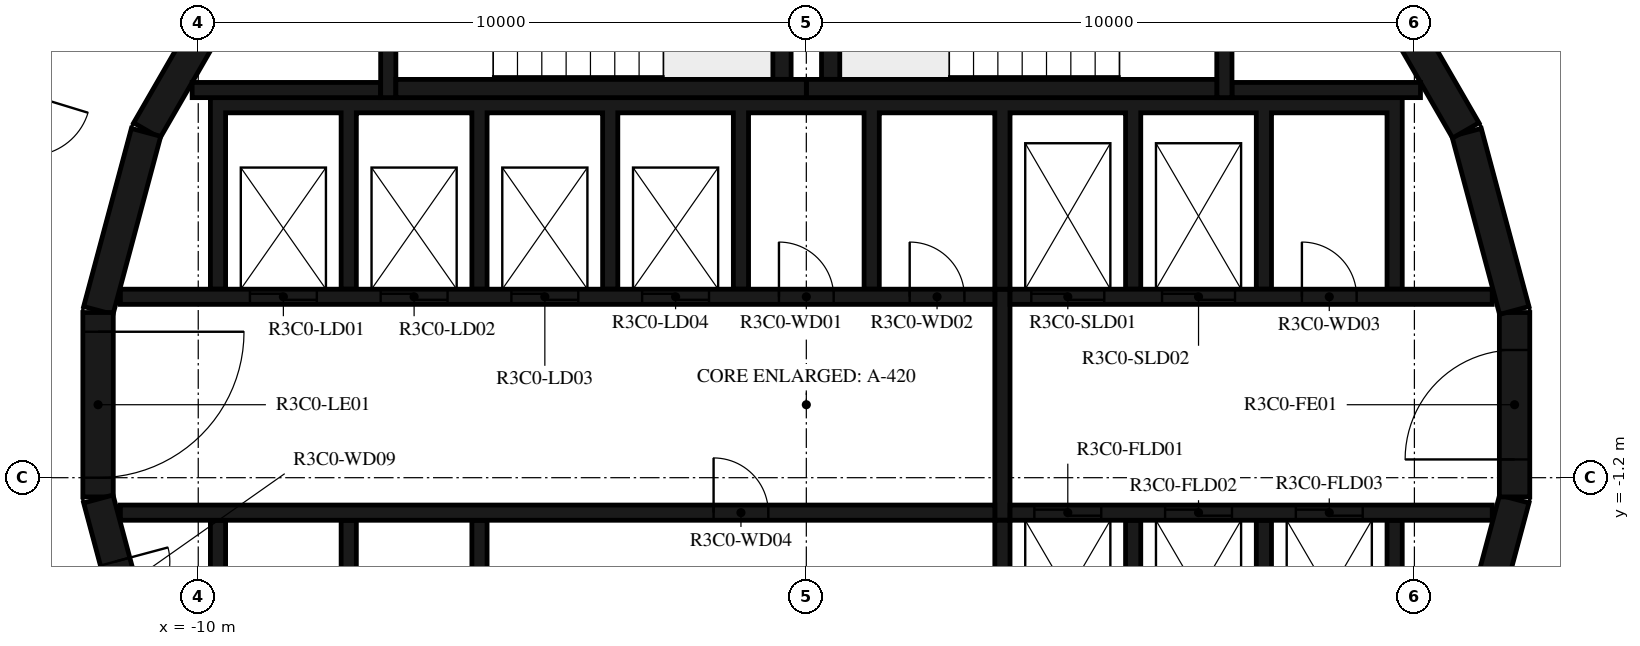
"""IFC4 building model, lengths in metres.
Left out: names, types, materials, properties, quantities, classifications, styles, units other than length and angle.
Written with IfcOpenShell. Run it as: python <this file> out.ifc"""

import sys

from ifc_helpers import new_model, si_unit, direction, frame, frame_2d, origin, place, context, subcontext, project, spatial, polyline, rectangle, outline, extrude, element, fill, save


model = new_model("IFC4")
c1 = context("Model", 3, precision=1e-05, world=origin(), true_north=direction((0.0, 1.0)))
c2 = subcontext(c1, "Body", "Model", "MODEL_VIEW")
j1 = project(units=[si_unit("LENGTHUNIT", "METRE"), si_unit("PLANEANGLEUNIT", "RADIAN")], contexts=[c1])
p1 = place(None, origin())
s1 = spatial("IfcSite", under=j1, at=p1, CompositionType="ELEMENT")
p2 = place(p1, origin())
s2 = spatial("IfcBuilding", under=s1, at=p2, CompositionType="ELEMENT")
p3 = place(p2, frame((0.0, 0.0, 141.4)))
s3 = spatial("IfcBuildingStorey", under=s2, at=p3, CompositionType="ELEMENT", Elevation=141.4)
p4 = place(p3, frame((10.858, -4.479, 0.0), z_axis=(0.0, 0.0, 1.0), x_axis=(0.258734743916, 0.965948410781, 0.0)))
e1 = element("IfcWall", 1, at=p4, inside=s3, PredefinedType="SHEAR", context=c2, shape_type="SweptSolid", body=[
    extrude(rectangle(XDim=3.033, YDim=0.5, at=frame_2d((1.516, 0.0))), origin(), (0.0, 0.0, 1.0), 3.05),
])
p5 = place(p3, frame((11.647, -1.516, 0.0), z_axis=(0.0, 0.0, 1.0), x_axis=(0.0, 1.0, 0.0)))
e2 = element("IfcWall", 2, at=p5, inside=s3, PredefinedType="SHEAR", context=c2, shape_type="SweptSolid", body=[
    extrude(rectangle(XDim=3.033, YDim=0.5, at=frame_2d((1.516, 0.0))), origin(), (0.0, 0.0, 1.0), 3.05),
])
p6 = place(p5, frame((0.616, 0.0, 0.0)))
e3 = element("IfcOpeningElement", 3, at=p6, cuts=e2, PredefinedType="OPENING", context=c2, shape_type="SweptSolid", body=[
    extrude(rectangle(XDim=1.8, YDim=2.1, at=frame_2d((0.9, 1.05))), frame((0.0, 0.26, 0.0), z_axis=(0.0, -1.0, 0.0), x_axis=(1.0, 0.0, 0.0)), (0.0, 0.0, 1.0), 0.52),
])
for number, where, z_axis, x_axis in (
    (4, (11.643, 1.55, 0.0), (0.0, 0.0, 1.0), (-0.259, 0.966, 0.0)),
    (5, (10.845, 4.51, 0.0), (0.0, 0.0, 1.0), (-0.5, 0.866, 0.0)),
    (6, (-9.329, 7.137, 0.0), (0.0, 0.0, 1.0), (-0.5, -0.866, 0.0)),
    (7, (-10.858, 4.479, 0.0), (0.0, 0.0, 1.0), (-0.259, -0.966, 0.0)),
):
    element("IfcWall", number, at=place(p3, frame(where, z_axis=z_axis, x_axis=x_axis)), inside=s3, PredefinedType="SHEAR", context=c2, shape_type="SweptSolid", body=[
        extrude(rectangle(XDim=3.033, YDim=0.5, at=frame_2d((1.516, 0.0))), origin(), (0.0, 0.0, 1.0), 3.05),
    ])
p7 = place(p3, frame((-11.647, 1.516, 0.0), z_axis=(0.0, 0.0, 1.0), x_axis=(0.0, -1.0, 0.0)))
e8 = element("IfcWall", 8, at=p7, inside=s3, PredefinedType="SHEAR", context=c2, shape_type="SweptSolid", body=[
    extrude(rectangle(XDim=3.033, YDim=0.5, at=frame_2d((1.516, 0.0))), origin(), (0.0, 0.0, 1.0), 3.05),
])
p8 = place(p7, frame((0.316, 0.0, 0.0)))
e9 = element("IfcOpeningElement", 9, at=p8, cuts=e8, PredefinedType="OPENING", context=c2, shape_type="SweptSolid", body=[
    extrude(rectangle(XDim=2.4, YDim=2.1, at=frame_2d((1.2, 1.05))), frame((0.0, 0.26, 0.0), z_axis=(0.0, -1.0, 0.0), x_axis=(1.0, 0.0, 0.0)), (0.0, 0.0, 1.0), 0.52),
])
p9 = place(p3, frame((-11.643, -1.55, 0.0), z_axis=(0.0, 0.0, 1.0), x_axis=(0.258734743916, -0.965948410781, 0.0)))
e10 = element("IfcWall", 10, at=p9, inside=s3, PredefinedType="SHEAR", context=c2, shape_type="SweptSolid", body=[
    extrude(rectangle(XDim=3.033, YDim=0.5, at=frame_2d((1.516, 0.0))), origin(), (0.0, 0.0, 1.0), 3.05),
])
p10 = place(p9, frame((1.066, 0.0, 0.0)))
e11 = element("IfcOpeningElement", 11, at=p10, cuts=e10, PredefinedType="OPENING", context=c2, shape_type="SweptSolid", body=[
    extrude(rectangle(XDim=0.9, YDim=2.1, at=frame_2d((0.45, 1.05))), frame((0.0, 0.26, 0.0), z_axis=(0.0, -1.0, 0.0), x_axis=(1.0, 0.0, 0.0)), (0.0, 0.0, 1.0), 0.52),
])
p11 = place(p3, frame((0.0, 5.2, 0.0), z_axis=(0.0, 0.0, 1.0), x_axis=(1.0, 0.0, 0.0)))
e12 = element("IfcWall", 12, at=p11, inside=s3, PredefinedType="SHEAR", context=c2, shape_type="SweptSolid", body=[
    extrude(rectangle(XDim=6.75, YDim=0.3, at=frame_2d((3.375, 0.0))), origin(), (0.0, 0.0, 1.0), 3.05),
])
p12 = place(p3, frame((0.4, 5.35, 0.0), z_axis=(0.0, 0.0, 1.0), x_axis=(0.0, 1.0, 0.0)))
e13 = element("IfcWall", 13, at=p12, inside=s3, PredefinedType="SHEAR", context=c2, shape_type="SweptSolid", body=[
    extrude(rectangle(XDim=3.32, YDim=0.3, at=frame_2d((1.66, 0.0))), origin(), (0.0, 0.0, 1.0), 3.05),
])
p13 = place(p3, frame((6.875, 5.05, 0.0), z_axis=(0.0, 0.0, 1.0), x_axis=(0.0, 1.0, 0.0)))
e14 = element("IfcWall", 14, at=p13, inside=s3, PredefinedType="SHEAR", context=c2, shape_type="SweptSolid", body=[
    extrude(rectangle(XDim=3.92, YDim=0.25, at=frame_2d((1.96, 0.0))), origin(), (0.0, 0.0, 1.0), 3.05),
])
p14 = place(p13, frame((1.11, 0.0, 0.0)))
e15 = element("IfcOpeningElement", 15, at=p14, cuts=e14, PredefinedType="OPENING", context=c2, shape_type="SweptSolid", body=[
    extrude(rectangle(XDim=1.2, YDim=2.1, at=frame_2d((0.6, 1.05))), frame((0.0, 0.135, 0.0), z_axis=(0.0, -1.0, 0.0), x_axis=(1.0, 0.0, 0.0)), (0.0, 0.0, 1.0), 0.27),
])
p15 = place(p3, frame((7.0, 5.175, 0.0), z_axis=(0.0, 0.0, 1.0), x_axis=(1.0, 0.0, 0.0)))
e16 = element("IfcWall", 16, at=p15, inside=s3, PredefinedType="SHEAR", context=c2, shape_type="SweptSolid", body=[
    extrude(rectangle(XDim=3.1, YDim=0.25, at=frame_2d((1.55, 0.0))), origin(), (0.0, 0.0, 1.0), 3.05),
])
p16 = place(p3, frame((-6.75, 5.2, 0.0), z_axis=(0.0, 0.0, 1.0), x_axis=(1.0, 0.0, 0.0)))
e17 = element("IfcWall", 17, at=p16, inside=s3, PredefinedType="SHEAR", context=c2, shape_type="SweptSolid", body=[
    extrude(rectangle(XDim=6.75, YDim=0.3, at=frame_2d((3.375, 0.0))), origin(), (0.0, 0.0, 1.0), 3.05),
])
p17 = place(p3, frame((-0.4, 5.35, 0.0), z_axis=(0.0, 0.0, 1.0), x_axis=(0.0, 1.0, 0.0)))
e18 = element("IfcWall", 18, at=p17, inside=s3, PredefinedType="SHEAR", context=c2, shape_type="SweptSolid", body=[
    extrude(rectangle(XDim=3.32, YDim=0.3, at=frame_2d((1.66, 0.0))), origin(), (0.0, 0.0, 1.0), 3.05),
])
p18 = place(p3, frame((-6.875, 8.97, 0.0), z_axis=(0.0, 0.0, 1.0), x_axis=(0.0, -1.0, 0.0)))
e19 = element("IfcWall", 19, at=p18, inside=s3, PredefinedType="SHEAR", context=c2, shape_type="SweptSolid", body=[
    extrude(rectangle(XDim=3.92, YDim=0.25, at=frame_2d((1.96, 0.0))), origin(), (0.0, 0.0, 1.0), 3.05),
])
p19 = place(p18, frame((1.61, 0.0, 0.0)))
e20 = element("IfcOpeningElement", 20, at=p19, cuts=e19, PredefinedType="OPENING", context=c2, shape_type="SweptSolid", body=[
    extrude(rectangle(XDim=1.2, YDim=2.1, at=frame_2d((0.6, 1.05))), frame((0.0, 0.135, 0.0), z_axis=(0.0, -1.0, 0.0), x_axis=(1.0, 0.0, 0.0)), (0.0, 0.0, 1.0), 0.27),
])
p20 = place(p3, frame((-7.0, 5.175, 0.0), z_axis=(0.0, 0.0, 1.0), x_axis=(-1.0, 0.0, 0.0)))
e21 = element("IfcWall", 21, at=p20, inside=s3, PredefinedType="SHEAR", context=c2, shape_type="SweptSolid", body=[
    extrude(rectangle(XDim=3.1, YDim=0.25, at=frame_2d((1.55, 0.0))), origin(), (0.0, 0.0, 1.0), 3.05),
])
p21 = place(p3, origin())
e22 = element("IfcWall", 22, at=p21, inside=s3, PredefinedType="SHEAR", context=c2, shape_type="SweptSolid", body=[
    extrude(outline(polyline([(-9.55, 4.8), (-7.65, 4.8), (-7.65, 1.9), (-7.4, 1.9), (-7.4, 4.8), (-5.5, 4.8), (-5.5, 1.9), (-5.25, 1.9), (-5.25, 4.8), (-3.35, 4.8), (-3.35, 1.9), (-3.1, 1.9), (-3.1, 4.8), (-1.2, 4.8), (-1.2, 1.9), (-0.95, 1.9), (-0.95, 4.8), (0.95, 4.8), (0.95, 1.9), (1.2, 1.9), (1.2, 4.8), (3.1, 4.8), (3.1, 1.9), (3.35, 1.9), (3.35, 4.8), (5.25, 4.8), (5.25, 1.9), (5.5, 1.9), (5.5, 4.8), (7.4, 4.8), (7.4, 1.9), (7.65, 1.9), (7.65, 4.8), (9.55, 4.8), (9.55, 1.9), (9.8, 1.9), (9.8, 4.8), (9.8, 5.05), (-9.8, 5.05), (-9.8, 4.8), (-9.8, 1.9), (-9.55, 1.9), (-9.55, 4.8)])), origin(), (0.0, 0.0, 1.0), 3.05),
])
p22 = place(p3, origin())
e23 = element("IfcWall", 23, at=p22, inside=s3, PredefinedType="SHEAR", context=c2, shape_type="SweptSolid", body=[
    extrude(outline(polyline([(9.8, -5.05), (9.8, -4.8), (9.8, -1.9), (9.55, -1.9), (9.55, -4.8), (7.65, -4.8), (7.65, -1.9), (7.4, -1.9), (7.4, -4.8), (5.5, -4.8), (5.5, -1.9), (5.25, -1.9), (5.25, -4.8), (3.35, -4.8), (3.35, -1.9), (3.1, -1.9), (3.1, -4.8), (-5.25, -4.8), (-5.25, -1.9), (-5.5, -1.9), (-5.5, -4.8), (-7.4, -4.8), (-7.4, -1.9), (-7.65, -1.9), (-7.65, -4.8), (-9.55, -4.8), (-9.55, -1.9), (-9.8, -1.9), (-9.8, -4.8), (-9.8, -5.05), (9.8, -5.05)])), origin(), (0.0, 0.0, 1.0), 3.05),
])
p23 = place(p3, frame((-11.28, 1.775, 0.0), z_axis=(0.0, 0.0, 1.0), x_axis=(1.0, 0.0, 0.0)))
e24 = element("IfcWall", 24, at=p23, inside=s3, PredefinedType="SHEAR", context=c2, shape_type="SweptSolid", body=[
    extrude(rectangle(XDim=14.38, YDim=0.25, at=frame_2d((7.19, 0.0))), origin(), (0.0, 0.0, 1.0), 3.05),
])
p24 = place(p23, frame((2.13, 0.0, 0.0)))
e25 = element("IfcOpeningElement", 25, at=p24, cuts=e24, PredefinedType="OPENING", context=c2, shape_type="SweptSolid", body=[
    extrude(rectangle(XDim=1.1, YDim=2.1, at=frame_2d((0.55, 1.05))), frame((0.0, 0.135, 0.0), z_axis=(0.0, -1.0, 0.0), x_axis=(1.0, 0.0, 0.0)), (0.0, 0.0, 1.0), 0.27),
])
p25 = place(p23, frame((4.28, 0.0, 0.0)))
e26 = element("IfcOpeningElement", 26, at=p25, cuts=e24, PredefinedType="OPENING", context=c2, shape_type="SweptSolid", body=[
    extrude(rectangle(XDim=1.1, YDim=2.1, at=frame_2d((0.55, 1.05))), frame((0.0, 0.135, 0.0), z_axis=(0.0, -1.0, 0.0), x_axis=(1.0, 0.0, 0.0)), (0.0, 0.0, 1.0), 0.27),
])
p26 = place(p23, frame((6.43, 0.0, 0.0)))
e27 = element("IfcOpeningElement", 27, at=p26, cuts=e24, PredefinedType="OPENING", context=c2, shape_type="SweptSolid", body=[
    extrude(rectangle(XDim=1.1, YDim=2.1, at=frame_2d((0.55, 1.05))), frame((0.0, 0.135, 0.0), z_axis=(0.0, -1.0, 0.0), x_axis=(1.0, 0.0, 0.0)), (0.0, 0.0, 1.0), 0.27),
])
p27 = place(p23, frame((8.58, 0.0, 0.0)))
e28 = element("IfcOpeningElement", 28, at=p27, cuts=e24, PredefinedType="OPENING", context=c2, shape_type="SweptSolid", body=[
    extrude(rectangle(XDim=1.1, YDim=2.1, at=frame_2d((0.55, 1.05))), frame((0.0, 0.135, 0.0), z_axis=(0.0, -1.0, 0.0), x_axis=(1.0, 0.0, 0.0)), (0.0, 0.0, 1.0), 0.27),
])
p28 = place(p23, frame((10.83, 0.0, 0.0)))
e29 = element("IfcOpeningElement", 29, at=p28, cuts=e24, PredefinedType="OPENING", context=c2, shape_type="SweptSolid", body=[
    extrude(rectangle(XDim=0.9, YDim=2.1, at=frame_2d((0.45, 1.05))), frame((0.0, 0.135, 0.0), z_axis=(0.0, -1.0, 0.0), x_axis=(1.0, 0.0, 0.0)), (0.0, 0.0, 1.0), 0.27),
])
p29 = place(p23, frame((12.98, 0.0, 0.0)))
e30 = element("IfcOpeningElement", 30, at=p29, cuts=e24, PredefinedType="OPENING", context=c2, shape_type="SweptSolid", body=[
    extrude(rectangle(XDim=0.9, YDim=2.1, at=frame_2d((0.45, 1.05))), frame((0.0, 0.135, 0.0), z_axis=(0.0, -1.0, 0.0), x_axis=(1.0, 0.0, 0.0)), (0.0, 0.0, 1.0), 0.27),
])
p30 = place(p3, frame((3.35, 1.775, 0.0), z_axis=(0.0, 0.0, 1.0), x_axis=(1.0, 0.0, 0.0)))
e31 = element("IfcWall", 31, at=p30, inside=s3, PredefinedType="SHEAR", context=c2, shape_type="SweptSolid", body=[
    extrude(rectangle(XDim=7.93, YDim=0.25, at=frame_2d((3.965, 0.0))), origin(), (0.0, 0.0, 1.0), 3.05),
])
p31 = place(p30, frame((0.35, 0.0, 0.0)))
e32 = element("IfcOpeningElement", 32, at=p31, cuts=e31, PredefinedType="OPENING", context=c2, shape_type="SweptSolid", body=[
    extrude(rectangle(XDim=1.2, YDim=2.4, at=frame_2d((0.6, 1.2))), frame((0.0, 0.135, 0.0), z_axis=(0.0, -1.0, 0.0), x_axis=(1.0, 0.0, 0.0)), (0.0, 0.0, 1.0), 0.27),
])
p32 = place(p30, frame((2.5, 0.0, 0.0)))
e33 = element("IfcOpeningElement", 33, at=p32, cuts=e31, PredefinedType="OPENING", context=c2, shape_type="SweptSolid", body=[
    extrude(rectangle(XDim=1.2, YDim=2.4, at=frame_2d((0.6, 1.2))), frame((0.0, 0.135, 0.0), z_axis=(0.0, -1.0, 0.0), x_axis=(1.0, 0.0, 0.0)), (0.0, 0.0, 1.0), 0.27),
])
p33 = place(p30, frame((4.8, 0.0, 0.0)))
e34 = element("IfcOpeningElement", 34, at=p33, cuts=e31, PredefinedType="OPENING", context=c2, shape_type="SweptSolid", body=[
    extrude(rectangle(XDim=0.9, YDim=2.1, at=frame_2d((0.45, 1.05))), frame((0.0, 0.135, 0.0), z_axis=(0.0, -1.0, 0.0), x_axis=(1.0, 0.0, 0.0)), (0.0, 0.0, 1.0), 0.27),
])
p34 = place(p3, frame((-11.28, -1.775, 0.0), z_axis=(0.0, 0.0, 1.0), x_axis=(1.0, 0.0, 0.0)))
e35 = element("IfcWall", 35, at=p34, inside=s3, PredefinedType="SHEAR", context=c2, shape_type="SweptSolid", body=[
    extrude(rectangle(XDim=14.38, YDim=0.25, at=frame_2d((7.19, 0.0))), origin(), (0.0, 0.0, 1.0), 3.05),
])
p35 = place(p34, frame((9.755, 0.0, 0.0)))
e36 = element("IfcOpeningElement", 36, at=p35, cuts=e35, PredefinedType="OPENING", context=c2, shape_type="SweptSolid", body=[
    extrude(rectangle(XDim=0.9, YDim=2.1, at=frame_2d((0.45, 1.05))), frame((0.0, 0.135, 0.0), z_axis=(0.0, -1.0, 0.0), x_axis=(1.0, 0.0, 0.0)), (0.0, 0.0, 1.0), 0.27),
])
p36 = place(p3, frame((3.35, -1.775, 0.0), z_axis=(0.0, 0.0, 1.0), x_axis=(1.0, 0.0, 0.0)))
e37 = element("IfcWall", 37, at=p36, inside=s3, PredefinedType="SHEAR", context=c2, shape_type="SweptSolid", body=[
    extrude(rectangle(XDim=7.93, YDim=0.25, at=frame_2d((3.965, 0.0))), origin(), (0.0, 0.0, 1.0), 3.05),
])
p37 = place(p36, frame((0.4, 0.0, 0.0)))
e38 = element("IfcOpeningElement", 38, at=p37, cuts=e37, PredefinedType="OPENING", context=c2, shape_type="SweptSolid", body=[
    extrude(rectangle(XDim=1.1, YDim=2.4, at=frame_2d((0.55, 1.2))), frame((0.0, 0.135, 0.0), z_axis=(0.0, -1.0, 0.0), x_axis=(1.0, 0.0, 0.0)), (0.0, 0.0, 1.0), 0.27),
])
p38 = place(p36, frame((2.55, 0.0, 0.0)))
e39 = element("IfcOpeningElement", 39, at=p38, cuts=e37, PredefinedType="OPENING", context=c2, shape_type="SweptSolid", body=[
    extrude(rectangle(XDim=1.1, YDim=2.4, at=frame_2d((0.55, 1.2))), frame((0.0, 0.135, 0.0), z_axis=(0.0, -1.0, 0.0), x_axis=(1.0, 0.0, 0.0)), (0.0, 0.0, 1.0), 0.27),
])
p39 = place(p36, frame((4.7, 0.0, 0.0)))
e40 = element("IfcOpeningElement", 40, at=p39, cuts=e37, PredefinedType="OPENING", context=c2, shape_type="SweptSolid", body=[
    extrude(rectangle(XDim=1.1, YDim=2.4, at=frame_2d((0.55, 1.2))), frame((0.0, 0.135, 0.0), z_axis=(0.0, -1.0, 0.0), x_axis=(1.0, 0.0, 0.0)), (0.0, 0.0, 1.0), 0.27),
])
p40 = place(p3, frame((3.225, -1.9, 0.0), z_axis=(0.0, 0.0, 1.0), x_axis=(0.0, 1.0, 0.0)))
e41 = element("IfcWall", 41, at=p40, inside=s3, PredefinedType="SHEAR", context=c2, shape_type="SweptSolid", body=[
    extrude(rectangle(XDim=3.8, YDim=0.25, at=frame_2d((1.9, 0.0))), origin(), (0.0, 0.0, 1.0), 3.05),
])
p41 = place(p3, frame((12.028, -7.516, 0.0), z_axis=(0.0, 0.0, 1.0), x_axis=(0.292365533182, 0.956306642771, 0.0)))
e42 = element("IfcWall", 42, at=p41, inside=s3, PredefinedType="STANDARD", context=c2, shape_type="SweptSolid", body=[
    extrude(rectangle(XDim=7.342, YDim=0.2, at=frame_2d((3.671, 0.0))), origin(), (0.0, 0.0, 1.0), 3.05),
])
p42 = place(p3, frame((-12.028, 7.516, 0.0), z_axis=(0.0, 0.0, 1.0), x_axis=(-0.292365533182, -0.956306642771, 0.0)))
e43 = element("IfcWall", 43, at=p42, inside=s3, PredefinedType="STANDARD", context=c2, shape_type="SweptSolid", body=[
    extrude(rectangle(XDim=7.342, YDim=0.2, at=frame_2d((3.671, 0.0))), origin(), (0.0, 0.0, 1.0), 3.05),
])
p43 = place(p42, frame((2.533, 0.0, 0.0)))
e44 = element("IfcOpeningElement", 44, at=p43, cuts=e43, PredefinedType="OPENING", context=c2, shape_type="SweptSolid", body=[
    extrude(rectangle(XDim=1.0, YDim=2.1, at=frame_2d((0.5, 1.05))), frame((0.0, 0.11, 0.0), z_axis=(0.0, -1.0, 0.0), x_axis=(1.0, 0.0, 0.0)), (0.0, 0.0, 1.0), 0.22),
])
p44 = place(p8, origin())
e45 = element("IfcDoor", 45, at=p44, inside=s3, OperationType="DOUBLE_DOOR_SINGLE_SWING", PredefinedType="DOOR", context=c2, shape_type="SweptSolid", body=[
    extrude(rectangle(XDim=2.4, YDim=2.1, at=frame_2d((1.2, 1.05))), frame((0.0, 0.025, 0.0), z_axis=(0.0, -1.0, 0.0), x_axis=(1.0, 0.0, 0.0)), (0.0, 0.0, 1.0), 0.05),
])
fill(e9, e45)
p45 = place(p6, origin())
e46 = element("IfcDoor", 46, at=p45, inside=s3, OperationType="DOUBLE_DOOR_SINGLE_SWING", PredefinedType="DOOR", context=c2, shape_type="SweptSolid", body=[
    extrude(rectangle(XDim=1.8, YDim=2.1, at=frame_2d((0.9, 1.05))), frame((0.0, 0.025, 0.0), z_axis=(0.0, -1.0, 0.0), x_axis=(1.0, 0.0, 0.0)), (0.0, 0.0, 1.0), 0.05),
])
fill(e3, e46)
p46 = place(p24, origin())
e47 = element("IfcDoor", 47, at=p46, inside=s3, OperationType="DOUBLE_DOOR_SLIDING", PredefinedType="DOOR", context=c2, shape_type="SweptSolid", body=[
    extrude(rectangle(XDim=1.1, YDim=2.1, at=frame_2d((0.55, 1.05))), frame((0.0, 0.025, 0.0), z_axis=(0.0, -1.0, 0.0), x_axis=(1.0, 0.0, 0.0)), (0.0, 0.0, 1.0), 0.05),
])
fill(e25, e47)
p47 = place(p25, origin())
e48 = element("IfcDoor", 48, at=p47, inside=s3, OperationType="DOUBLE_DOOR_SLIDING", PredefinedType="DOOR", context=c2, shape_type="SweptSolid", body=[
    extrude(rectangle(XDim=1.1, YDim=2.1, at=frame_2d((0.55, 1.05))), frame((0.0, 0.025, 0.0), z_axis=(0.0, -1.0, 0.0), x_axis=(1.0, 0.0, 0.0)), (0.0, 0.0, 1.0), 0.05),
])
fill(e26, e48)
p48 = place(p26, origin())
e49 = element("IfcDoor", 49, at=p48, inside=s3, OperationType="DOUBLE_DOOR_SLIDING", PredefinedType="DOOR", context=c2, shape_type="SweptSolid", body=[
    extrude(rectangle(XDim=1.1, YDim=2.1, at=frame_2d((0.55, 1.05))), frame((0.0, 0.025, 0.0), z_axis=(0.0, -1.0, 0.0), x_axis=(1.0, 0.0, 0.0)), (0.0, 0.0, 1.0), 0.05),
])
fill(e27, e49)
p49 = place(p27, origin())
e50 = element("IfcDoor", 50, at=p49, inside=s3, OperationType="DOUBLE_DOOR_SLIDING", PredefinedType="DOOR", context=c2, shape_type="SweptSolid", body=[
    extrude(rectangle(XDim=1.1, YDim=2.1, at=frame_2d((0.55, 1.05))), frame((0.0, 0.025, 0.0), z_axis=(0.0, -1.0, 0.0), x_axis=(1.0, 0.0, 0.0)), (0.0, 0.0, 1.0), 0.05),
])
fill(e28, e50)
p50 = place(p31, origin())
e51 = element("IfcDoor", 51, at=p50, inside=s3, OperationType="DOUBLE_DOOR_SLIDING", PredefinedType="DOOR", context=c2, shape_type="SweptSolid", body=[
    extrude(rectangle(XDim=1.2, YDim=2.4, at=frame_2d((0.6, 1.2))), frame((0.0, 0.025, 0.0), z_axis=(0.0, -1.0, 0.0), x_axis=(1.0, 0.0, 0.0)), (0.0, 0.0, 1.0), 0.05),
])
fill(e32, e51)
p51 = place(p32, origin())
e52 = element("IfcDoor", 52, at=p51, inside=s3, OperationType="DOUBLE_DOOR_SLIDING", PredefinedType="DOOR", context=c2, shape_type="SweptSolid", body=[
    extrude(rectangle(XDim=1.2, YDim=2.4, at=frame_2d((0.6, 1.2))), frame((0.0, 0.025, 0.0), z_axis=(0.0, -1.0, 0.0), x_axis=(1.0, 0.0, 0.0)), (0.0, 0.0, 1.0), 0.05),
])
fill(e33, e52)
p52 = place(p37, origin())
e53 = element("IfcDoor", 53, at=p52, inside=s3, OperationType="DOUBLE_DOOR_SLIDING", PredefinedType="DOOR", context=c2, shape_type="SweptSolid", body=[
    extrude(rectangle(XDim=1.1, YDim=2.4, at=frame_2d((0.55, 1.2))), frame((0.0, 0.025, 0.0), z_axis=(0.0, -1.0, 0.0), x_axis=(1.0, 0.0, 0.0)), (0.0, 0.0, 1.0), 0.05),
])
fill(e38, e53)
p53 = place(p38, origin())
e54 = element("IfcDoor", 54, at=p53, inside=s3, OperationType="DOUBLE_DOOR_SLIDING", PredefinedType="DOOR", context=c2, shape_type="SweptSolid", body=[
    extrude(rectangle(XDim=1.1, YDim=2.4, at=frame_2d((0.55, 1.2))), frame((0.0, 0.025, 0.0), z_axis=(0.0, -1.0, 0.0), x_axis=(1.0, 0.0, 0.0)), (0.0, 0.0, 1.0), 0.05),
])
fill(e39, e54)
p54 = place(p39, origin())
e55 = element("IfcDoor", 55, at=p54, inside=s3, OperationType="DOUBLE_DOOR_SLIDING", PredefinedType="DOOR", context=c2, shape_type="SweptSolid", body=[
    extrude(rectangle(XDim=1.1, YDim=2.4, at=frame_2d((0.55, 1.2))), frame((0.0, 0.025, 0.0), z_axis=(0.0, -1.0, 0.0), x_axis=(1.0, 0.0, 0.0)), (0.0, 0.0, 1.0), 0.05),
])
fill(e40, e55)
p55 = place(p28, origin())
e56 = element("IfcDoor", 56, at=p55, inside=s3, OperationType="SINGLE_SWING_RIGHT", PredefinedType="DOOR", context=c2, shape_type="SweptSolid", body=[
    extrude(rectangle(XDim=0.9, YDim=2.1, at=frame_2d((0.45, 1.05))), frame((0.0, 0.025, 0.0), z_axis=(0.0, -1.0, 0.0), x_axis=(1.0, 0.0, 0.0)), (0.0, 0.0, 1.0), 0.05),
])
fill(e29, e56)
p56 = place(p29, origin())
e57 = element("IfcDoor", 57, at=p56, inside=s3, OperationType="SINGLE_SWING_LEFT", PredefinedType="DOOR", context=c2, shape_type="SweptSolid", body=[
    extrude(rectangle(XDim=0.9, YDim=2.1, at=frame_2d((0.45, 1.05))), frame((0.0, 0.025, 0.0), z_axis=(0.0, -1.0, 0.0), x_axis=(1.0, 0.0, 0.0)), (0.0, 0.0, 1.0), 0.05),
])
fill(e30, e57)
p57 = place(p33, origin())
e58 = element("IfcDoor", 58, at=p57, inside=s3, OperationType="SINGLE_SWING_RIGHT", PredefinedType="DOOR", context=c2, shape_type="SweptSolid", body=[
    extrude(rectangle(XDim=0.9, YDim=2.1, at=frame_2d((0.45, 1.05))), frame((0.0, 0.025, 0.0), z_axis=(0.0, -1.0, 0.0), x_axis=(1.0, 0.0, 0.0)), (0.0, 0.0, 1.0), 0.05),
])
fill(e34, e58)
p58 = place(p35, origin())
e59 = element("IfcDoor", 59, at=p58, inside=s3, OperationType="SINGLE_SWING_LEFT", PredefinedType="DOOR", context=c2, shape_type="SweptSolid", body=[
    extrude(rectangle(XDim=0.9, YDim=2.1, at=frame_2d((0.45, 1.05))), frame((0.0, 0.025, 0.0), z_axis=(0.0, -1.0, 0.0), x_axis=(1.0, 0.0, 0.0)), (0.0, 0.0, 1.0), 0.05),
])
fill(e36, e59)
p59 = place(p10, origin())
e60 = element("IfcDoor", 60, at=p59, inside=s3, OperationType="SINGLE_SWING_RIGHT", PredefinedType="DOOR", context=c2, shape_type="SweptSolid", body=[
    extrude(rectangle(XDim=0.9, YDim=2.1, at=frame_2d((0.45, 1.05))), frame((0.0, 0.025, 0.0), z_axis=(0.0, -1.0, 0.0), x_axis=(1.0, 0.0, 0.0)), (0.0, 0.0, 1.0), 0.05),
])
fill(e11, e60)
save(model, sys.argv[1])
